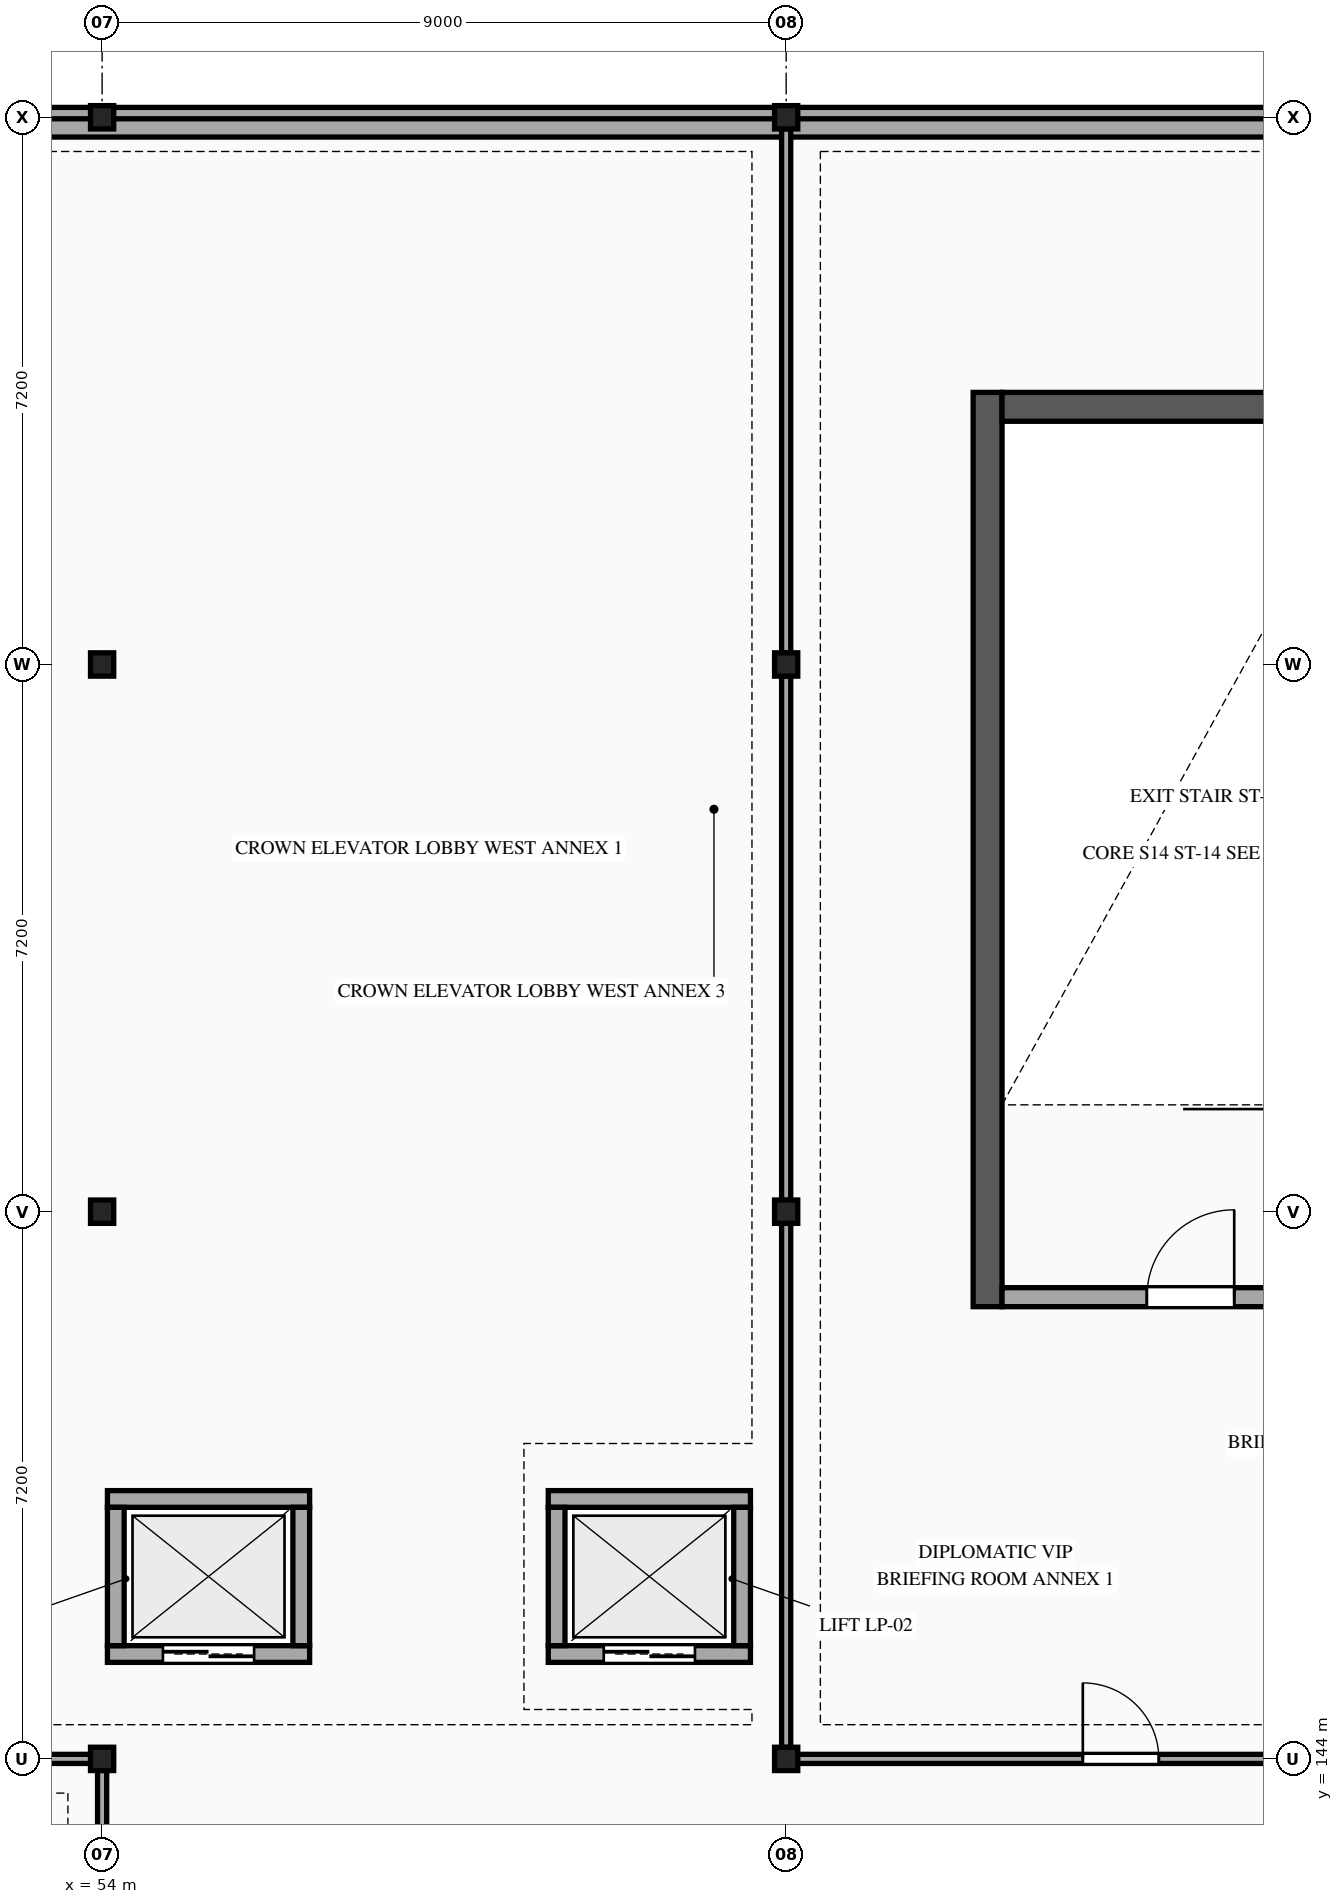
"""IFC4 building model, lengths in metres.
Left out: names, types, materials, properties, quantities, classifications, styles, units other than length and angle.
Written with IfcOpenShell. Run it as: python <this file> out.ifc"""

import sys

from ifc_helpers import new_model, si_unit, direction, frame, frame_2d, origin, origin_2d, place, context, subcontext, project, spatial, rectangle, i_section, extrude, element, fill, save


model = new_model("IFC4")
c1 = context("Model", 3, precision=1e-05, world=origin(), true_north=direction((0.0, 1.0)))
c2 = subcontext(c1, "Body", "Model", "MODEL_VIEW")
j1 = project(units=[si_unit("LENGTHUNIT", "METRE"), si_unit("PLANEANGLEUNIT", "RADIAN")], contexts=[c1])
p1 = place(None, origin())
s1 = spatial("IfcSite", under=j1, at=p1, CompositionType="ELEMENT")
p2 = place(p1, origin())
s2 = spatial("IfcBuilding", under=s1, at=p2, CompositionType="ELEMENT")
p3 = place(p2, frame((0.0, 0.0, 24.3)))
s3 = spatial("IfcBuildingStorey", under=s2, at=p3, CompositionType="ELEMENT", Elevation=24.3)
for number, where, z_axis, x_axis in (
    (1, (54.0, 144.0, 0.0), (0.0, 0.0, 1.0), (1.0, 0.0, 0.0)),
    (2, (54.0, 151.2, 0.0), (0.0, 0.0, 1.0), (1.0, 0.0, 0.0)),
    (3, (54.0, 158.4, 0.0), (0.0, 0.0, 1.0), (1.0, 0.0, 0.0)),
    (4, (54.0, 165.6, 0.0), (0.0, 0.0, 1.0), (1.0, 0.0, 0.0)),
    (5, (63.0, 144.0, 0.0), (0.0, 0.0, 1.0), (1.0, 0.0, 0.0)),
    (6, (63.0, 151.2, 0.0), (0.0, 0.0, 1.0), (1.0, 0.0, 0.0)),
    (7, (63.0, 158.4, 0.0), (0.0, 0.0, 1.0), (1.0, 0.0, 0.0)),
    (8, (63.0, 165.6, 0.0), (0.0, 0.0, 1.0), (1.0, 0.0, 0.0)),
):
    element("IfcColumn", number, at=place(p3, frame(where, z_axis=z_axis, x_axis=x_axis)), inside=s3, PredefinedType="COLUMN", context=c2, shape_type="SweptSolid", body=[
        extrude(i_section(OverallWidth=0.305, OverallDepth=0.307, WebThickness=0.01, FlangeThickness=0.015, at=origin_2d()), origin(), (0.0, 0.0, 1.0), 4.5),
    ])
p4 = place(p3, frame((65.65, 149.95, 0.0), z_axis=(0.0, 0.0, 1.0), x_axis=(0.0, 1.0, 0.0)))
e9 = element("IfcWall", 9, at=p4, inside=s3, PredefinedType="SHEAR", context=c2, shape_type="SweptSolid", body=[
    extrude(rectangle(XDim=12.03, YDim=0.38, at=frame_2d((6.015, 0.0))), origin(), (0.0, 0.0, 1.0), 4.26),
])
p5 = place(p3, frame((65.84, 161.79, 0.0), z_axis=(0.0, 0.0, 1.0), x_axis=(1.0, 0.0, 0.0)))
e10 = element("IfcWall", 10, at=p5, inside=s3, PredefinedType="SHEAR", context=c2, shape_type="SweptSolid", body=[
    extrude(rectangle(XDim=4.96, YDim=0.38, at=frame_2d((2.48, 0.0))), origin(), (0.0, 0.0, 1.0), 4.26),
])
for number, where, z_axis, x_axis in (
    (11, (45.005, 165.6, 0.0), (0.0, 0.0, 1.0), (1.0, 0.0, 0.0)),
    (12, (54.005, 165.6, 0.0), (0.0, 0.0, 1.0), (1.0, 0.0, 0.0)),
):
    element("IfcWall", number, at=place(p3, frame(where, z_axis=z_axis, x_axis=x_axis)), inside=s3, PredefinedType="STANDARD", context=c2, shape_type="SweptSolid", body=[
        extrude(rectangle(XDim=8.99, YDim=0.26, at=frame_2d((4.495, 0.0))), origin(), (0.0, 0.0, 1.0), 3.648),
    ])
p6 = place(p3, frame((63.005, 165.6, 0.0), z_axis=(0.0, 0.0, 1.0), x_axis=(1.0, 0.0, 0.0)))
e13 = element("IfcWall", 13, at=p6, inside=s3, PredefinedType="STANDARD", context=c2, shape_type="SweptSolid", body=[
    extrude(rectangle(XDim=8.796, YDim=0.26, at=frame_2d((4.398, 0.0))), origin(), (0.0, 0.0, 1.0), 3.648),
])
p7 = place(p3, frame((36.14, 165.46, 4.5), z_axis=(0.0, 0.0, 1.0), x_axis=(1.0, 0.0, 0.0)))
e14 = element("IfcWall", 14, at=p7, inside=s3, PredefinedType="PARAPET", context=c2, shape_type="SweptSolid", body=[
    extrude(rectangle(XDim=62.72, YDim=0.24, at=frame_2d((31.36, 0.0))), origin(), (0.0, 0.0, 1.0), 0.65),
])
p8 = place(p3, frame((54.07, 145.38, 0.0), z_axis=(0.0, 0.0, 1.0), x_axis=(1.0, 0.0, 0.0)))
e15 = element("IfcWall", 15, at=p8, inside=s3, PredefinedType="STANDARD", context=c2, shape_type="SweptSolid", body=[
    extrude(rectangle(XDim=2.66, YDim=0.22, at=frame_2d((1.33, 0.0))), origin(), (0.0, 0.0, 1.0), 3.648),
])
p9 = place(p8, frame((0.73, 0.0, 0.0)))
e16 = element("IfcOpeningElement", 16, at=p9, cuts=e15, PredefinedType="OPENING", context=c2, shape_type="SweptSolid", body=[
    extrude(rectangle(XDim=1.2, YDim=2.2, at=frame_2d((0.6, 1.1))), frame((0.0, 0.12, 0.0), z_axis=(0.0, -1.0, 0.0), x_axis=(1.0, 0.0, 0.0)), (0.0, 0.0, 1.0), 0.24),
])
p10 = place(p3, frame((56.73, 147.42, 0.0), z_axis=(0.0, 0.0, 1.0), x_axis=(-1.0, 0.0, 0.0)))
e17 = element("IfcWall", 17, at=p10, inside=s3, PredefinedType="STANDARD", context=c2, shape_type="SweptSolid", body=[
    extrude(rectangle(XDim=2.66, YDim=0.22, at=frame_2d((1.33, 0.0))), origin(), (0.0, 0.0, 1.0), 3.648),
])
for number, where, z_axis, x_axis in (
    (18, (54.18, 147.31, 0.0), (0.0, 0.0, 1.0), (0.0, -1.0, 0.0)),
    (19, (56.62, 145.49, 0.0), (0.0, 0.0, 1.0), (0.0, 1.0, 0.0)),
):
    element("IfcWall", number, at=place(p3, frame(where, z_axis=z_axis, x_axis=x_axis)), inside=s3, PredefinedType="STANDARD", context=c2, shape_type="SweptSolid", body=[
        extrude(rectangle(XDim=1.82, YDim=0.22, at=frame_2d((0.91, 0.0))), origin(), (0.0, 0.0, 1.0), 3.648),
    ])
p11 = place(p3, frame((59.87, 145.38, 0.0), z_axis=(0.0, 0.0, 1.0), x_axis=(1.0, 0.0, 0.0)))
e20 = element("IfcWall", 20, at=p11, inside=s3, PredefinedType="STANDARD", context=c2, shape_type="SweptSolid", body=[
    extrude(rectangle(XDim=2.66, YDim=0.22, at=frame_2d((1.33, 0.0))), origin(), (0.0, 0.0, 1.0), 4.26),
])
p12 = place(p11, frame((0.73, 0.0, 0.0)))
e21 = element("IfcOpeningElement", 21, at=p12, cuts=e20, PredefinedType="OPENING", context=c2, shape_type="SweptSolid", body=[
    extrude(rectangle(XDim=1.2, YDim=2.2, at=frame_2d((0.6, 1.1))), frame((0.0, 0.12, 0.0), z_axis=(0.0, -1.0, 0.0), x_axis=(1.0, 0.0, 0.0)), (0.0, 0.0, 1.0), 0.24),
])
p13 = place(p3, frame((62.53, 147.42, 0.0), z_axis=(0.0, 0.0, 1.0), x_axis=(-1.0, 0.0, 0.0)))
e22 = element("IfcWall", 22, at=p13, inside=s3, PredefinedType="STANDARD", context=c2, shape_type="SweptSolid", body=[
    extrude(rectangle(XDim=2.66, YDim=0.22, at=frame_2d((1.33, 0.0))), origin(), (0.0, 0.0, 1.0), 4.26),
])
for number, where, z_axis, x_axis in (
    (23, (59.98, 147.31, 0.0), (0.0, 0.0, 1.0), (0.0, -1.0, 0.0)),
    (24, (62.42, 145.49, 0.0), (0.0, 0.0, 1.0), (0.0, 1.0, 0.0)),
):
    element("IfcWall", number, at=place(p3, frame(where, z_axis=z_axis, x_axis=x_axis)), inside=s3, PredefinedType="STANDARD", context=c2, shape_type="SweptSolid", body=[
        extrude(rectangle(XDim=1.82, YDim=0.22, at=frame_2d((0.91, 0.0))), origin(), (0.0, 0.0, 1.0), 4.26),
    ])
p14 = place(p3, frame((65.84, 150.075, 0.0), z_axis=(0.0, 0.0, 1.0), x_axis=(1.0, 0.0, 0.0)))
e25 = element("IfcWall", 25, at=p14, inside=s3, PredefinedType="STANDARD", context=c2, shape_type="SweptSolid", body=[
    extrude(rectangle(XDim=4.96, YDim=0.25, at=frame_2d((2.48, 0.0))), origin(), (0.0, 0.0, 1.0), 4.26),
])
p15 = place(p14, frame((1.905, 0.0, 0.0)))
e26 = element("IfcOpeningElement", 26, at=p15, cuts=e25, PredefinedType="OPENING", context=c2, shape_type="SweptSolid", body=[
    extrude(rectangle(XDim=1.15, YDim=2.2, at=frame_2d((0.575, 1.1))), frame((0.0, 0.135, 0.0), z_axis=(0.0, -1.0, 0.0), x_axis=(1.0, 0.0, 0.0)), (0.0, 0.0, 1.0), 0.27),
])
p16 = place(p3, frame((45.005, 144.0, 0.0), z_axis=(0.0, 0.0, 1.0), x_axis=(1.0, 0.0, 0.0)))
e27 = element("IfcWall", 27, at=p16, inside=s3, PredefinedType="PARTITIONING", context=c2, shape_type="SweptSolid", body=[
    extrude(rectangle(XDim=8.99, YDim=0.12, at=frame_2d((4.495, 0.0))), origin(), (0.0, 0.0, 1.0), 3.648),
])
p17 = place(p16, frame((3.97, 0.0, 0.0)))
e28 = element("IfcOpeningElement", 28, at=p17, cuts=e27, PredefinedType="OPENING", context=c2, shape_type="SweptSolid", body=[
    extrude(rectangle(XDim=1.05, YDim=2.15, at=frame_2d((0.525, 1.075))), frame((0.0, 0.07, 0.0), z_axis=(0.0, -1.0, 0.0), x_axis=(1.0, 0.0, 0.0)), (0.0, 0.0, 1.0), 0.14),
])
p18 = place(p3, frame((63.005, 144.0, 0.0), z_axis=(0.0, 0.0, 1.0), x_axis=(1.0, 0.0, 0.0)))
e29 = element("IfcWall", 29, at=p18, inside=s3, PredefinedType="PARTITIONING", context=c2, shape_type="SweptSolid", body=[
    extrude(rectangle(XDim=8.796, YDim=0.12, at=frame_2d((4.398, 0.0))), origin(), (0.0, 0.0, 1.0), 3.648),
])
p19 = place(p18, frame((3.898, 0.0, 0.0)))
e30 = element("IfcOpeningElement", 30, at=p19, cuts=e29, PredefinedType="OPENING", context=c2, shape_type="SweptSolid", body=[
    extrude(rectangle(XDim=1.0, YDim=2.15, at=frame_2d((0.5, 1.075))), frame((0.0, 0.07, 0.0), z_axis=(0.0, -1.0, 0.0), x_axis=(1.0, 0.0, 0.0)), (0.0, 0.0, 1.0), 0.14),
])
for number, where, z_axis, x_axis in (
    (31, (54.0, 136.951, 0.0), (0.0, 0.0, 1.0), (0.0, 1.0, 0.0)),
    (32, (63.0, 144.152, 0.0), (0.0, 0.0, 1.0), (0.0, 1.0, 0.0)),
    (33, (63.0, 151.352, 0.0), (0.0, 0.0, 1.0), (0.0, 1.0, 0.0)),
    (34, (63.0, 158.552, 0.0), (0.0, 0.0, 1.0), (0.0, 1.0, 0.0)),
):
    element("IfcWall", number, at=place(p3, frame(where, z_axis=z_axis, x_axis=x_axis)), inside=s3, PredefinedType="PARTITIONING", context=c2, shape_type="SweptSolid", body=[
        extrude(rectangle(XDim=6.897, YDim=0.12, at=frame_2d((3.448, 0.0))), origin(), (0.0, 0.0, 1.0), 3.648),
    ])
p20 = place(p9, origin())
e35 = element("IfcDoor", 35, at=p20, inside=s3, OperationType="DOUBLE_DOOR_SLIDING", PredefinedType="DOOR", context=c2, shape_type="SweptSolid", body=[
    extrude(rectangle(XDim=1.2, YDim=2.2, at=frame_2d((0.6, 1.1))), frame((0.0, 0.025, 0.0), z_axis=(0.0, -1.0, 0.0), x_axis=(1.0, 0.0, 0.0)), (0.0, 0.0, 1.0), 0.05),
])
fill(e16, e35)
p21 = place(p12, origin())
e36 = element("IfcDoor", 36, at=p21, inside=s3, OperationType="DOUBLE_DOOR_SLIDING", PredefinedType="DOOR", context=c2, shape_type="SweptSolid", body=[
    extrude(rectangle(XDim=1.2, YDim=2.2, at=frame_2d((0.6, 1.1))), frame((0.0, 0.025, 0.0), z_axis=(0.0, -1.0, 0.0), x_axis=(1.0, 0.0, 0.0)), (0.0, 0.0, 1.0), 0.05),
])
fill(e21, e36)
p22 = place(p15, origin())
e37 = element("IfcDoor", 37, at=p22, inside=s3, OperationType="SINGLE_SWING_RIGHT", PredefinedType="DOOR", context=c2, shape_type="SweptSolid", body=[
    extrude(rectangle(XDim=1.15, YDim=2.2, at=frame_2d((0.575, 1.1))), frame((0.0, 0.025, 0.0), z_axis=(0.0, -1.0, 0.0), x_axis=(1.0, 0.0, 0.0)), (0.0, 0.0, 1.0), 0.05),
])
fill(e26, e37)
p23 = place(p19, origin())
e38 = element("IfcDoor", 38, at=p23, inside=s3, OperationType="SINGLE_SWING_LEFT", PredefinedType="DOOR", context=c2, shape_type="SweptSolid", body=[
    extrude(rectangle(XDim=1.0, YDim=2.15, at=frame_2d((0.5, 1.075))), frame((0.0, 0.025, 0.0), z_axis=(0.0, -1.0, 0.0), x_axis=(1.0, 0.0, 0.0)), (0.0, 0.0, 1.0), 0.05),
])
fill(e30, e38)
save(model, sys.argv[1])
